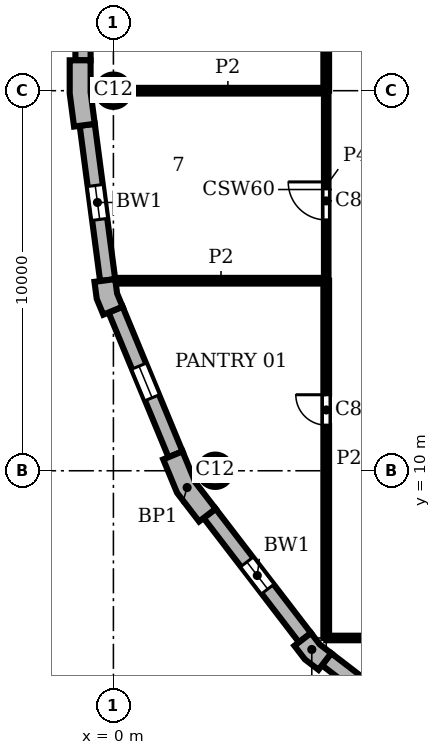
"""IFC4 building model, lengths in metres.
Left out: names, types, materials, properties, quantities, classifications, styles, units other than length and angle.
Written with IfcOpenShell. Run it as: python <this file> out.ifc"""

import sys

from ifc_helpers import new_model, si_unit, direction, frame, frame_2d, origin, origin_2d, place, context, subcontext, project, spatial, polyline, rectangle, circle, outline, extrude, element, fill, save


model = new_model("IFC4")
c1 = context("Model", 3, precision=1e-05, world=origin(), true_north=direction((0.0, 1.0)))
c2 = subcontext(c1, "Body", "Model", "MODEL_VIEW")
j1 = project(units=[si_unit("LENGTHUNIT", "METRE"), si_unit("PLANEANGLEUNIT", "RADIAN")], contexts=[c1])
p1 = place(None, origin())
s1 = spatial("IfcSite", under=j1, at=p1, CompositionType="ELEMENT")
p2 = place(p1, origin())
s2 = spatial("IfcBuilding", under=s1, at=p2, CompositionType="ELEMENT")
p3 = place(p2, frame((0.0, 0.0, 329.4)))
s3 = spatial("IfcBuildingStorey", under=s2, at=p3, CompositionType="ELEMENT", Elevation=329.4)
for number, where, z_axis, x_axis in (
    (1, (0.0, 20.0, 0.0), (0.0, 0.0, 1.0), (1.0, 0.0, 0.0)),
    (2, (2.679, 10.0, 0.0), (0.0, 0.0, 1.0), (1.0, 0.0, 0.0)),
):
    element("IfcColumn", number, at=place(p3, frame(where, z_axis=z_axis, x_axis=x_axis)), inside=s3, PredefinedType="COLUMN", context=c2, shape_type="SweptSolid", body=[
        extrude(circle(Radius=0.425, at=origin_2d()), origin(), (0.0, 0.0, 1.0), 3.9),
    ])
p4 = place(p3, origin())
e3 = element("IfcWall", 3, at=p4, inside=s3, PredefinedType="SOLIDWALL", context=c2, shape_type="SweptSolid", body=[
    extrude(outline(polyline([(-1.0, 20.8), (-1.15, 20.8), (-1.15, 19.925), (-1.036, 19.057), (-0.887, 19.076), (-0.49, 19.128), (-0.6, 19.961), (-0.6, 20.8), (-1.0, 20.8)])), origin(), (0.0, 0.0, 1.0), 3.9),
])
e4 = element("IfcWall", 4, at=p4, inside=s3, PredefinedType="SOLIDWALL", context=c2, shape_type="SweptSolid", body=[
    extrude(outline(polyline([(-0.349, 14.99), (-0.498, 14.971), (-0.439, 14.523), (-0.266, 14.106), (-0.128, 14.164), (0.242, 14.317), (0.097, 14.667), (0.047, 15.043), (-0.349, 14.99)])), origin(), (0.0, 0.0, 1.0), 3.9),
])
e5 = element("IfcWall", 5, at=p4, inside=s3, PredefinedType="SOLIDWALL", context=c2, shape_type="SweptSolid", body=[
    extrude(outline(polyline([(1.449, 10.356), (1.311, 10.299), (1.675, 9.42), (2.254, 8.665), (2.373, 8.757), (2.69, 9.0), (2.155, 9.698), (1.819, 10.51), (1.449, 10.356)])), origin(), (0.0, 0.0, 1.0), 3.9),
])
e6 = element("IfcWall", 6, at=p4, inside=s3, PredefinedType="SOLIDWALL", context=c2, shape_type="SweptSolid", body=[
    extrude(outline(polyline([(4.882, 5.487), (4.763, 5.396), (5.038, 5.038), (5.396, 4.763), (5.487, 4.882), (5.731, 5.199), (5.43, 5.43), (5.199, 5.731), (4.882, 5.487)])), origin(), (0.0, 0.0, 1.0), 3.9),
])
p5 = place(p3, frame((-0.8, 39.2, 0.0), z_axis=(0.0, 0.0, 1.0), x_axis=(0.0, -1.0, 0.0)))
e7 = element("IfcWall", 7, at=p5, inside=s3, PredefinedType="SOLIDWALL", context=c2, shape_type="SweptSolid", body=[
    extrude(rectangle(XDim=18.4, YDim=0.4, at=frame_2d((9.2, 0.0))), origin(), (0.0, 0.0, 1.0), 3.9),
])
p6 = place(p5, frame((3.75, 0.0, 0.9)))
e8 = element("IfcOpeningElement", 8, at=p6, cuts=e7, PredefinedType="OPENING", context=c2, shape_type="SweptSolid", body=[
    extrude(rectangle(XDim=0.9, YDim=2.35, at=frame_2d((0.45, 1.175))), frame((0.0, 0.21, 0.0), z_axis=(0.0, -1.0, 0.0), x_axis=(1.0, 0.0, 0.0)), (0.0, 0.0, 1.0), 0.42),
])
p7 = place(p5, frame((13.75, 0.0, 0.9)))
e9 = element("IfcOpeningElement", 9, at=p7, cuts=e7, PredefinedType="OPENING", context=c2, shape_type="SweptSolid", body=[
    extrude(rectangle(XDim=0.9, YDim=2.35, at=frame_2d((0.45, 1.175))), frame((0.0, 0.21, 0.0), z_axis=(0.0, -1.0, 0.0), x_axis=(1.0, 0.0, 0.0)), (0.0, 0.0, 1.0), 0.42),
])
p8 = place(p3, frame((-0.689, 19.102, 0.0), z_axis=(0.0, 0.0, 1.0), x_axis=(0.130514280502, -0.991446429508, 0.0)))
e10 = element("IfcWall", 10, at=p8, inside=s3, PredefinedType="SOLIDWALL", context=c2, shape_type="SweptSolid", body=[
    extrude(rectangle(XDim=4.121, YDim=0.4, at=frame_2d((2.061, 0.0))), origin(), (0.0, 0.0, 1.0), 3.9),
])
p9 = place(p8, frame((1.611, 0.0, 0.9)))
e11 = element("IfcOpeningElement", 11, at=p9, cuts=e10, PredefinedType="OPENING", context=c2, shape_type="SweptSolid", body=[
    extrude(rectangle(XDim=0.9, YDim=2.35, at=frame_2d((0.45, 1.175))), frame((0.0, 0.21, 0.0), z_axis=(0.0, -1.0, 0.0), x_axis=(1.0, 0.0, 0.0)), (0.0, 0.0, 1.0), 0.42),
])
p10 = place(p3, frame((0.057, 14.24, 0.0), z_axis=(0.0, 0.0, 1.0), x_axis=(0.382721546029, -0.923863744394, 0.0)))
e12 = element("IfcWall", 12, at=p10, inside=s3, PredefinedType="SOLIDWALL", context=c2, shape_type="SweptSolid", body=[
    extrude(rectangle(XDim=4.121, YDim=0.4, at=frame_2d((2.061, 0.0))), origin(), (0.0, 0.0, 1.0), 3.9),
])
p11 = place(p10, frame((1.611, 0.0, 0.9)))
e13 = element("IfcOpeningElement", 13, at=p11, cuts=e12, PredefinedType="OPENING", context=c2, shape_type="SweptSolid", body=[
    extrude(rectangle(XDim=0.9, YDim=2.35, at=frame_2d((0.45, 1.175))), frame((0.0, 0.21, 0.0), z_axis=(0.0, -1.0, 0.0), x_axis=(1.0, 0.0, 0.0)), (0.0, 0.0, 1.0), 0.42),
])
p12 = place(p3, frame((2.532, 8.878, 0.0), z_axis=(0.0, 0.0, 1.0), x_axis=(0.608759824817, -0.793354571229, 0.0)))
e14 = element("IfcWall", 14, at=p12, inside=s3, PredefinedType="SOLIDWALL", context=c2, shape_type="SweptSolid", body=[
    extrude(rectangle(XDim=4.121, YDim=0.4, at=frame_2d((2.061, 0.0))), origin(), (0.0, 0.0, 1.0), 3.9),
])
p13 = place(p12, frame((1.611, 0.0, 0.9)))
e15 = element("IfcOpeningElement", 15, at=p13, cuts=e14, PredefinedType="OPENING", context=c2, shape_type="SweptSolid", body=[
    extrude(rectangle(XDim=0.9, YDim=2.35, at=frame_2d((0.45, 1.175))), frame((0.0, 0.21, 0.0), z_axis=(0.0, -1.0, 0.0), x_axis=(1.0, 0.0, 0.0)), (0.0, 0.0, 1.0), 0.42),
])
p14 = place(p3, frame((5.609, 5.041, 0.0), z_axis=(0.0, 0.0, 1.0), x_axis=(0.793354571229, -0.608759824817, 0.0)))
e16 = element("IfcWall", 16, at=p14, inside=s3, PredefinedType="SOLIDWALL", context=c2, shape_type="SweptSolid", body=[
    extrude(rectangle(XDim=4.121, YDim=0.4, at=frame_2d((2.061, 0.0))), origin(), (0.0, 0.0, 1.0), 3.9),
])
p15 = place(p14, frame((1.611, 0.0, 0.9)))
e17 = element("IfcOpeningElement", 17, at=p15, cuts=e16, PredefinedType="OPENING", context=c2, shape_type="SweptSolid", body=[
    extrude(rectangle(XDim=0.9, YDim=2.35, at=frame_2d((0.45, 1.175))), frame((0.0, 0.21, 0.0), z_axis=(0.0, -1.0, 0.0), x_axis=(1.0, 0.0, 0.0)), (0.0, 0.0, 1.0), 0.42),
])
p16 = place(p3, frame((5.6, 5.6, 0.0), z_axis=(0.0, 0.0, 1.0), x_axis=(0.0, 1.0, 0.0)))
e18 = element("IfcWall", 18, at=p16, inside=s3, PredefinedType="PARTITIONING", context=c2, shape_type="SweptSolid", body=[
    extrude(rectangle(XDim=9.4, YDim=0.15, at=frame_2d((4.7, 0.0))), origin(), (0.0, 0.0, 1.0), 3.45),
])
p17 = place(p16, frame((5.6, 0.0, 0.0)))
e19 = element("IfcOpeningElement", 19, at=p17, cuts=e18, PredefinedType="OPENING", context=c2, shape_type="SweptSolid", body=[
    extrude(rectangle(XDim=0.8, YDim=2.1, at=frame_2d((0.4, 1.05))), frame((0.0, 0.085, 0.0), z_axis=(0.0, -1.0, 0.0), x_axis=(1.0, 0.0, 0.0)), (0.0, 0.0, 1.0), 0.17),
])
p18 = place(p3, frame((5.6, 20.0, 0.0), z_axis=(0.0, 0.0, 1.0), x_axis=(0.0, 1.0, 0.0)))
e20 = element("IfcWall", 20, at=p18, inside=s3, PredefinedType="PARTITIONING", context=c2, shape_type="SweptSolid", body=[
    extrude(rectangle(XDim=8.0, YDim=0.15, at=frame_2d((4.0, 0.0))), origin(), (0.0, 0.0, 1.0), 3.45),
])
p19 = place(p3, frame((0.063, 15.0, 0.0), z_axis=(0.0, 0.0, 1.0), x_axis=(1.0, 0.0, 0.0)))
e21 = element("IfcWall", 21, at=p19, inside=s3, PredefinedType="PARTITIONING", context=c2, shape_type="SweptSolid", body=[
    extrude(rectangle(XDim=5.537, YDim=0.15, at=frame_2d((2.769, 0.0))), origin(), (0.0, 0.0, 1.0), 3.45),
])
p20 = place(p3, frame((0.425, 20.0, 0.0), z_axis=(0.0, 0.0, 1.0), x_axis=(1.0, 0.0, 0.0)))
e22 = element("IfcWall", 22, at=p20, inside=s3, PredefinedType="PARTITIONING", context=c2, shape_type="SweptSolid", body=[
    extrude(rectangle(XDim=5.175, YDim=0.15, at=frame_2d((2.587, 0.0))), origin(), (0.0, 0.0, 1.0), 3.45),
])
p21 = place(p3, frame((5.6, 15.0, 0.0), z_axis=(0.0, 0.0, 1.0), x_axis=(0.0, 1.0, 0.0)))
e23 = element("IfcWall", 23, at=p21, inside=s3, PredefinedType="PARTITIONING", context=c2, shape_type="SweptSolid", body=[
    extrude(rectangle(XDim=5.0, YDim=0.12, at=frame_2d((2.5, 0.0))), origin(), (0.0, 0.0, 1.0), 3.45),
])
p22 = place(p21, frame((1.6, 0.0, 0.0)))
e24 = element("IfcOpeningElement", 24, at=p22, cuts=e23, PredefinedType="OPENING", context=c2, shape_type="SweptSolid", body=[
    extrude(rectangle(XDim=1.0, YDim=2.1, at=frame_2d((0.5, 1.05))), frame((0.0, 0.07, 0.0), z_axis=(0.0, -1.0, 0.0), x_axis=(1.0, 0.0, 0.0)), (0.0, 0.0, 1.0), 0.14),
])
p23 = place(p3, frame((5.6, 5.6, 0.0), z_axis=(0.0, 0.0, 1.0), x_axis=(1.0, 0.0, 0.0)))
e25 = element("IfcWall", 25, at=p23, inside=s3, PredefinedType="PARTITIONING", context=c2, shape_type="SweptSolid", body=[
    extrude(rectangle(XDim=25.4, YDim=0.12, at=frame_2d((12.7, 0.0))), origin(), (0.0, 0.0, 1.0), 3.45),
])
p24 = place(p23, frame((14.6, 0.0, 0.0)))
e26 = element("IfcOpeningElement", 26, at=p24, cuts=e25, PredefinedType="OPENING", context=c2, shape_type="SweptSolid", body=[
    extrude(rectangle(XDim=1.8, YDim=2.1, at=frame_2d((0.9, 1.05))), frame((0.0, 0.07, 0.0), z_axis=(0.0, -1.0, 0.0), x_axis=(1.0, 0.0, 0.0)), (0.0, 0.0, 1.0), 0.14),
])
p25 = place(p9, origin())
e27 = element("IfcWindow", 27, at=p25, inside=s3, PartitioningType="SINGLE_PANEL", PredefinedType="WINDOW", context=c2, shape_type="SweptSolid", body=[
    extrude(rectangle(XDim=0.9, YDim=2.35, at=frame_2d((0.45, 1.175))), frame((0.0, 0.16, 0.0), z_axis=(0.0, -1.0, 0.0), x_axis=(1.0, 0.0, 0.0)), (0.0, 0.0, 1.0), 0.06),
])
fill(e11, e27)
p26 = place(p11, origin())
e28 = element("IfcWindow", 28, at=p26, inside=s3, PartitioningType="SINGLE_PANEL", PredefinedType="WINDOW", context=c2, shape_type="SweptSolid", body=[
    extrude(rectangle(XDim=0.9, YDim=2.35, at=frame_2d((0.45, 1.175))), frame((0.0, 0.16, 0.0), z_axis=(0.0, -1.0, 0.0), x_axis=(1.0, 0.0, 0.0)), (0.0, 0.0, 1.0), 0.06),
])
fill(e13, e28)
p27 = place(p13, origin())
e29 = element("IfcWindow", 29, at=p27, inside=s3, PartitioningType="SINGLE_PANEL", PredefinedType="WINDOW", context=c2, shape_type="SweptSolid", body=[
    extrude(rectangle(XDim=0.9, YDim=2.35, at=frame_2d((0.45, 1.175))), frame((0.0, 0.16, 0.0), z_axis=(0.0, -1.0, 0.0), x_axis=(1.0, 0.0, 0.0)), (0.0, 0.0, 1.0), 0.06),
])
fill(e15, e29)
p28 = place(p17, origin())
e30 = element("IfcDoor", 30, at=p28, inside=s3, OperationType="SINGLE_SWING_RIGHT", PredefinedType="DOOR", context=c2, shape_type="SweptSolid", body=[
    extrude(rectangle(XDim=0.8, YDim=2.1, at=frame_2d((0.4, 1.05))), frame((0.0, 0.025, 0.0), z_axis=(0.0, -1.0, 0.0), x_axis=(1.0, 0.0, 0.0)), (0.0, 0.0, 1.0), 0.05),
])
fill(e19, e30)
p29 = place(p22, origin())
e31 = element("IfcDoor", 31, at=p29, inside=s3, OperationType="SINGLE_SWING_RIGHT", PredefinedType="DOOR", context=c2, shape_type="SweptSolid", body=[
    extrude(rectangle(XDim=1.0, YDim=2.1, at=frame_2d((0.5, 1.05))), frame((0.0, 0.025, 0.0), z_axis=(0.0, -1.0, 0.0), x_axis=(1.0, 0.0, 0.0)), (0.0, 0.0, 1.0), 0.05),
])
fill(e24, e31)
save(model, sys.argv[1])
